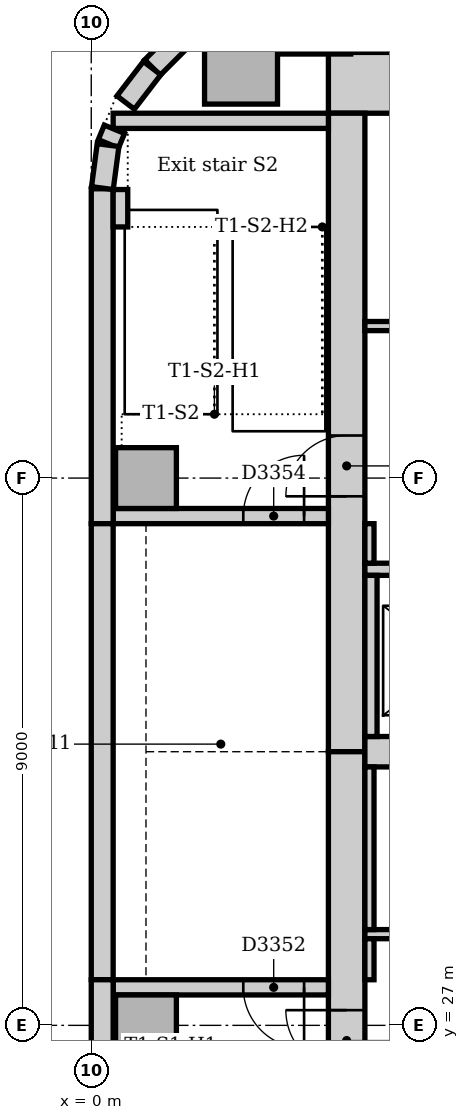
"""IFC4 building model, lengths in metres.
Left out: names, types, materials, properties, quantities, classifications, styles, units other than length and angle.
Written with IfcOpenShell. Run it as: python <this file> out.ifc"""

import sys

from ifc_helpers import new_model, si_unit, direction, frame, frame_2d, origin, origin_2d, place, context, subcontext, project, spatial, rectangle, extrude, element, fill, save


model = new_model("IFC4")
c1 = context("Model", 3, precision=1e-05, world=origin(), true_north=direction((0.0, 1.0)))
c2 = subcontext(c1, "Body", "Model", "MODEL_VIEW")
j1 = project(units=[si_unit("LENGTHUNIT", "METRE"), si_unit("PLANEANGLEUNIT", "RADIAN")], contexts=[c1])
p1 = place(None, origin())
s1 = spatial("IfcSite", under=j1, at=p1, CompositionType="ELEMENT")
p2 = place(p1, origin())
s2 = spatial("IfcBuilding", under=s1, at=p2, CompositionType="ELEMENT")
p3 = place(p2, frame((0.0, 0.0, 42.0)))
s3 = spatial("IfcBuildingStorey", under=s2, at=p3, CompositionType="ELEMENT", Elevation=42.0)
p4 = place(p3, frame((23.5, 42.5, 0.0), z_axis=(0.0, 0.0, 1.0), x_axis=(-1.0, 0.0, 0.0)))
e1 = element("IfcWall", 1, at=p4, inside=s3, PredefinedType="SOLIDWALL", context=c2, shape_type="SweptSolid", body=[
    extrude(rectangle(XDim=19.6, YDim=1.0, at=frame_2d((9.8, 0.0))), origin(), (0.0, 0.0, 1.0), 4.0),
])
p5 = place(p3, frame((4.2, 42.0, 0.0), z_axis=(0.0, 0.0, 1.0), x_axis=(0.0, -1.0, 0.0)))
e2 = element("IfcWall", 2, at=p5, inside=s3, PredefinedType="SOLIDWALL", context=c2, shape_type="SweptSolid", body=[
    extrude(rectangle(XDim=10.5, YDim=0.6, at=frame_2d((5.25, 0.0))), origin(), (0.0, 0.0, 1.0), 4.0),
])
p6 = place(p5, frame((5.3, 0.0, 0.0)))
e3 = element("IfcOpeningElement", 3, at=p6, cuts=e2, PredefinedType="OPENING", context=c2, shape_type="SweptSolid", body=[
    extrude(rectangle(XDim=1.0, YDim=2.1, at=frame_2d((0.5, 1.05))), frame((0.0, 0.31, 0.0), z_axis=(0.0, -1.0, 0.0), x_axis=(1.0, 0.0, 0.0)), (0.0, 0.0, 1.0), 0.62),
])
p7 = place(p3, frame((4.2, 31.5, 0.0), z_axis=(0.0, 0.0, 1.0), x_axis=(0.0, -1.0, 0.0)))
e4 = element("IfcWall", 4, at=p7, inside=s3, PredefinedType="SOLIDWALL", context=c2, shape_type="SweptSolid", body=[
    extrude(rectangle(XDim=10.5, YDim=0.6, at=frame_2d((5.25, 0.0))), origin(), (0.0, 0.0, 1.0), 4.0),
])
p8 = place(p7, frame((4.25, 0.0, 0.0)))
e5 = element("IfcOpeningElement", 5, at=p8, cuts=e4, PredefinedType="OPENING", context=c2, shape_type="SweptSolid", body=[
    extrude(rectangle(XDim=1.0, YDim=2.1, at=frame_2d((0.5, 1.05))), frame((0.0, 0.31, 0.0), z_axis=(0.0, -1.0, 0.0), x_axis=(1.0, 0.0, 0.0)), (0.0, 0.0, 1.0), 0.62),
])
p9 = place(p3, frame((4.5, 31.5, 0.0), z_axis=(0.0, 0.0, 1.0), x_axis=(1.0, 0.0, 0.0)))
e6 = element("IfcWall", 6, at=p9, inside=s3, PredefinedType="SOLIDWALL", context=c2, shape_type="SweptSolid", body=[
    extrude(rectangle(XDim=18.0, YDim=0.5, at=frame_2d((9.0, 0.0))), origin(), (0.0, 0.0, 1.0), 4.0),
])
p10 = place(p3, frame((3.9, 27.625, 0.0), z_axis=(0.0, 0.0, 1.0), x_axis=(-1.0, 0.0, 0.0)))
e7 = element("IfcWall", 7, at=p10, inside=s3, PredefinedType="SOLIDWALL", context=c2, shape_type="SweptSolid", body=[
    extrude(rectangle(XDim=3.54, YDim=0.25, at=frame_2d((1.77, 0.0))), origin(), (0.0, 0.0, 1.0), 4.0),
])
p11 = place(p10, frame((0.4, 0.0, 0.0)))
e8 = element("IfcOpeningElement", 8, at=p11, cuts=e7, PredefinedType="OPENING", context=c2, shape_type="SweptSolid", body=[
    extrude(rectangle(XDim=1.0, YDim=2.1, at=frame_2d((0.5, 1.05))), frame((0.0, 0.135, 0.0), z_axis=(0.0, -1.0, 0.0), x_axis=(1.0, 0.0, 0.0)), (0.0, 0.0, 1.0), 0.27),
])
p12 = place(p3, frame((0.36, 35.375, 0.0), z_axis=(0.0, 0.0, 1.0), x_axis=(1.0, 0.0, 0.0)))
e9 = element("IfcWall", 9, at=p12, inside=s3, PredefinedType="SOLIDWALL", context=c2, shape_type="SweptSolid", body=[
    extrude(rectangle(XDim=3.54, YDim=0.25, at=frame_2d((1.77, 0.0))), origin(), (0.0, 0.0, 1.0), 4.0),
])
p13 = place(p12, frame((2.14, 0.0, 0.0)))
e10 = element("IfcOpeningElement", 10, at=p13, cuts=e9, PredefinedType="OPENING", context=c2, shape_type="SweptSolid", body=[
    extrude(rectangle(XDim=1.0, YDim=2.1, at=frame_2d((0.5, 1.05))), frame((0.0, 0.135, 0.0), z_axis=(0.0, -1.0, 0.0), x_axis=(1.0, 0.0, 0.0)), (0.0, 0.0, 1.0), 0.27),
])
p14 = place(p3, frame((3.9, 41.875, 0.0), z_axis=(0.0, 0.0, 1.0), x_axis=(-1.0, 0.0, 0.0)))
e11 = element("IfcWall", 11, at=p14, inside=s3, PredefinedType="SOLIDWALL", context=c2, shape_type="SweptSolid", body=[
    extrude(rectangle(XDim=3.54, YDim=0.25, at=frame_2d((1.77, 0.0))), origin(), (0.0, 0.0, 1.0), 4.0),
])
for number, where, z_axis, x_axis in (
    (12, (3.667, 43.574, 0.0), (0.0, 0.0, 1.0), (1.0, 0.0, 0.0)),
    (13, (2.463, 42.75, 0.0), (0.0, 0.0, 1.0), (1.0, 0.0, 0.0)),
):
    element("IfcColumn", number, at=place(p3, frame(where, z_axis=z_axis, x_axis=x_axis)), inside=s3, PredefinedType="COLUMN", context=c2, shape_type="SweptSolid", body=[
        extrude(rectangle(XDim=1.2, YDim=1.2, at=origin_2d()), origin(), (0.0, 0.0, 1.0), 3.7),
    ])
for number, where, z_axis, x_axis in (
    (14, (0.9, 27.0, 0.0), (0.0, 0.0, 1.0), (1.0, 0.0, 0.0)),
    (15, (0.9, 36.0, 0.0), (0.0, 0.0, 1.0), (1.0, 0.0, 0.0)),
):
    element("IfcColumn", number, at=place(p3, frame(where, z_axis=z_axis, x_axis=x_axis)), inside=s3, PredefinedType="COLUMN", context=c2, shape_type="SweptSolid", body=[
        extrude(rectangle(XDim=1.0, YDim=1.0, at=origin_2d()), origin(), (0.0, 0.0, 1.0), 4.0),
    ])
p15 = place(p3, frame((2.249, 43.994, 0.0), z_axis=(0.0, 0.0, 1.0), x_axis=(-0.707106781187, -0.707106781187, 0.0)))
e16 = element("IfcWall", 16, at=p15, inside=s3, PredefinedType="STANDARD", context=c2, shape_type="SweptSolid", body=[
    extrude(rectangle(XDim=1.757, YDim=0.36, at=frame_2d((0.879, 0.0))), origin(), (0.0, 0.0, 1.0), 3.7),
])
p16 = place(p3, frame((0.18, 40.757, 0.0), z_axis=(0.0, 0.0, 1.0), x_axis=(0.0, -1.0, 0.0)))
e17 = element("IfcWall", 17, at=p16, inside=s3, PredefinedType="STANDARD", context=c2, shape_type="SweptSolid", body=[
    extrude(rectangle(XDim=5.507, YDim=0.36, at=frame_2d((2.754, 0.0))), origin(), (0.0, 0.0, 1.0), 3.7),
])
p17 = place(p3, frame((0.18, 35.25, 0.0), z_axis=(0.0, 0.0, 1.0), x_axis=(0.0, -1.0, 0.0)))
e18 = element("IfcWall", 18, at=p17, inside=s3, PredefinedType="STANDARD", context=c2, shape_type="SweptSolid", body=[
    extrude(rectangle(XDim=7.5, YDim=0.36, at=frame_2d((3.75, 0.0))), origin(), (0.0, 0.0, 1.0), 3.7),
])
p18 = place(p3, frame((0.18, 27.75, 0.0), z_axis=(0.0, 0.0, 1.0), x_axis=(0.0, -1.0, 0.0)))
e19 = element("IfcWall", 19, at=p18, inside=s3, PredefinedType="STANDARD", context=c2, shape_type="SweptSolid", body=[
    extrude(rectangle(XDim=6.75, YDim=0.36, at=frame_2d((3.375, 0.0))), origin(), (0.0, 0.0, 1.0), 3.7),
])
p19 = place(p3, frame((1.0, 42.741, 0.0), z_axis=(0.0, 0.0, 1.0), x_axis=(-0.608802368033, -0.793321924995, 0.0)))
e20 = element("IfcWall", 20, at=p19, inside=s3, PredefinedType="STANDARD", context=c2, shape_type="SweptSolid", body=[
    extrude(rectangle(XDim=0.713, YDim=0.36, at=frame_2d((0.357, 0.0))), origin(), (0.0, 0.0, 1.0), 3.7),
])
p20 = place(p3, frame((0.381, 41.736, 0.0), z_axis=(0.0, 0.0, 1.0), x_axis=(-0.382773360986, -0.923842277729, 0.0)))
e21 = element("IfcWall", 21, at=p20, inside=s3, PredefinedType="STANDARD", context=c2, shape_type="SweptSolid", body=[
    extrude(rectangle(XDim=0.258, YDim=0.36, at=frame_2d((0.129, 0.0))), origin(), (0.0, 0.0, 1.0), 3.7),
])
p21 = place(p3, frame((0.276, 41.476, 0.0), z_axis=(0.0, 0.0, 1.0), x_axis=(-0.13055608231, -0.99144092581, 0.0)))
e22 = element("IfcWall", 22, at=p21, inside=s3, PredefinedType="STANDARD", context=c2, shape_type="SweptSolid", body=[
    extrude(rectangle(XDim=0.713, YDim=0.36, at=frame_2d((0.356, 0.0))), origin(), (0.0, 0.0, 1.0), 3.7),
])
p22 = place(p3, frame((0.48, 40.13, 0.0), z_axis=(0.0, 0.0, 1.0), x_axis=(0.0, 1.0, 0.0)))
e23 = element("IfcWall", 23, at=p22, inside=s3, PredefinedType="STANDARD", context=c2, shape_type="SweptSolid", body=[
    extrude(rectangle(XDim=0.615, YDim=0.24, at=frame_2d((0.307, 0.0))), origin(), (0.0, 0.0, 1.0), 4.0),
])
p23 = place(p3, frame((4.5, 34.5, 0.0), z_axis=(0.0, 0.0, 1.0), x_axis=(1.0, 0.0, 0.0)))
e24 = element("IfcWall", 24, at=p23, inside=s3, PredefinedType="PARTITIONING", context=c2, shape_type="SweptSolid", body=[
    extrude(rectangle(XDim=18.0, YDim=0.2, at=frame_2d((9.0, 0.0))), origin(), (0.0, 0.0, 1.0), 3.7),
])
p24 = place(p23, frame((0.95, 0.0, 0.0)))
e25 = element("IfcOpeningElement", 25, at=p24, cuts=e24, PredefinedType="OPENING", context=c2, shape_type="SweptSolid", body=[
    extrude(rectangle(XDim=1.1, YDim=2.1, at=frame_2d((0.55, 1.05))), frame((0.0, 0.11, 0.0), z_axis=(0.0, -1.0, 0.0), x_axis=(1.0, 0.0, 0.0)), (0.0, 0.0, 1.0), 0.22),
])
p25 = place(p23, frame((3.95, 0.0, 0.0)))
e26 = element("IfcOpeningElement", 26, at=p25, cuts=e24, PredefinedType="OPENING", context=c2, shape_type="SweptSolid", body=[
    extrude(rectangle(XDim=1.1, YDim=2.1, at=frame_2d((0.55, 1.05))), frame((0.0, 0.11, 0.0), z_axis=(0.0, -1.0, 0.0), x_axis=(1.0, 0.0, 0.0)), (0.0, 0.0, 1.0), 0.22),
])
p26 = place(p23, frame((12.95, 0.0, 0.0)))
e27 = element("IfcOpeningElement", 27, at=p26, cuts=e24, PredefinedType="OPENING", context=c2, shape_type="SweptSolid", body=[
    extrude(rectangle(XDim=1.1, YDim=2.1, at=frame_2d((0.55, 1.05))), frame((0.0, 0.11, 0.0), z_axis=(0.0, -1.0, 0.0), x_axis=(1.0, 0.0, 0.0)), (0.0, 0.0, 1.0), 0.22),
])
p27 = place(p23, frame((15.95, 0.0, 0.0)))
e28 = element("IfcOpeningElement", 28, at=p27, cuts=e24, PredefinedType="OPENING", context=c2, shape_type="SweptSolid", body=[
    extrude(rectangle(XDim=1.1, YDim=2.1, at=frame_2d((0.55, 1.05))), frame((0.0, 0.11, 0.0), z_axis=(0.0, -1.0, 0.0), x_axis=(1.0, 0.0, 0.0)), (0.0, 0.0, 1.0), 0.22),
])
p28 = place(p3, frame((4.6, 31.75, 0.0), z_axis=(0.0, 0.0, 1.0), x_axis=(0.0, 1.0, 0.0)))
e29 = element("IfcWall", 29, at=p28, inside=s3, PredefinedType="PARTITIONING", context=c2, shape_type="SweptSolid", body=[
    extrude(rectangle(XDim=2.65, YDim=0.2, at=frame_2d((1.325, 0.0))), origin(), (0.0, 0.0, 1.0), 3.7),
])
p29 = place(p3, frame((4.5, 28.5, 0.0), z_axis=(0.0, 0.0, 1.0), x_axis=(1.0, 0.0, 0.0)))
e30 = element("IfcWall", 30, at=p29, inside=s3, PredefinedType="PARTITIONING", context=c2, shape_type="SweptSolid", body=[
    extrude(rectangle(XDim=18.0, YDim=0.15, at=frame_2d((9.0, 0.0))), origin(), (0.0, 0.0, 1.0), 3.7),
])
p30 = place(p29, frame((3.35, 0.0, 0.0)))
e31 = element("IfcOpeningElement", 31, at=p30, cuts=e30, PredefinedType="OPENING", context=c2, shape_type="SweptSolid", body=[
    extrude(rectangle(XDim=0.9, YDim=2.1, at=frame_2d((0.45, 1.05))), frame((0.0, 0.085, 0.0), z_axis=(0.0, -1.0, 0.0), x_axis=(1.0, 0.0, 0.0)), (0.0, 0.0, 1.0), 0.17),
])
p31 = place(p29, frame((8.55, 0.0, 0.0)))
e32 = element("IfcOpeningElement", 32, at=p31, cuts=e30, PredefinedType="OPENING", context=c2, shape_type="SweptSolid", body=[
    extrude(rectangle(XDim=0.9, YDim=2.1, at=frame_2d((0.45, 1.05))), frame((0.0, 0.085, 0.0), z_axis=(0.0, -1.0, 0.0), x_axis=(1.0, 0.0, 0.0)), (0.0, 0.0, 1.0), 0.17),
])
p32 = place(p29, frame((13.7, 0.0, 0.0)))
e33 = element("IfcOpeningElement", 33, at=p32, cuts=e30, PredefinedType="OPENING", context=c2, shape_type="SweptSolid", body=[
    extrude(rectangle(XDim=0.9, YDim=2.1, at=frame_2d((0.45, 1.05))), frame((0.0, 0.085, 0.0), z_axis=(0.0, -1.0, 0.0), x_axis=(1.0, 0.0, 0.0)), (0.0, 0.0, 1.0), 0.17),
])
p33 = place(p3, frame((4.5, 38.5, 0.0), z_axis=(0.0, 0.0, 1.0), x_axis=(1.0, 0.0, 0.0)))
e34 = element("IfcWall", 34, at=p33, inside=s3, PredefinedType="PARTITIONING", context=c2, shape_type="SweptSolid", body=[
    extrude(rectangle(XDim=11.9, YDim=0.15, at=frame_2d((5.95, 0.0))), origin(), (0.0, 0.0, 1.0), 3.7),
])
p34 = place(p33, frame((1.1, 0.0, 0.0)))
e35 = element("IfcOpeningElement", 35, at=p34, cuts=e34, PredefinedType="OPENING", context=c2, shape_type="SweptSolid", body=[
    extrude(rectangle(XDim=0.9, YDim=2.1, at=frame_2d((0.45, 1.05))), frame((0.0, 0.085, 0.0), z_axis=(0.0, -1.0, 0.0), x_axis=(1.0, 0.0, 0.0)), (0.0, 0.0, 1.0), 0.17),
])
p35 = place(p33, frame((3.3, 0.0, 0.0)))
e36 = element("IfcOpeningElement", 36, at=p35, cuts=e34, PredefinedType="OPENING", context=c2, shape_type="SweptSolid", body=[
    extrude(rectangle(XDim=0.9, YDim=2.1, at=frame_2d((0.45, 1.05))), frame((0.0, 0.085, 0.0), z_axis=(0.0, -1.0, 0.0), x_axis=(1.0, 0.0, 0.0)), (0.0, 0.0, 1.0), 0.17),
])
p36 = place(p33, frame((6.3, 0.0, 0.0)))
e37 = element("IfcOpeningElement", 37, at=p36, cuts=e34, PredefinedType="OPENING", context=c2, shape_type="SweptSolid", body=[
    extrude(rectangle(XDim=0.9, YDim=2.1, at=frame_2d((0.45, 1.05))), frame((0.0, 0.085, 0.0), z_axis=(0.0, -1.0, 0.0), x_axis=(1.0, 0.0, 0.0)), (0.0, 0.0, 1.0), 0.17),
])
p37 = place(p33, frame((9.95, 0.0, 0.0)))
e38 = element("IfcOpeningElement", 38, at=p37, cuts=e34, PredefinedType="OPENING", context=c2, shape_type="SweptSolid", body=[
    extrude(rectangle(XDim=0.8, YDim=2.1, at=frame_2d((0.4, 1.05))), frame((0.0, 0.085, 0.0), z_axis=(0.0, -1.0, 0.0), x_axis=(1.0, 0.0, 0.0)), (0.0, 0.0, 1.0), 0.17),
])
p38 = place(p3, frame((4.575, 27.75, 0.0), z_axis=(0.0, 0.0, 1.0), x_axis=(0.0, 1.0, 0.0)))
e39 = element("IfcWall", 39, at=p38, inside=s3, PredefinedType="PARTITIONING", context=c2, shape_type="SweptSolid", body=[
    extrude(rectangle(XDim=0.675, YDim=0.15, at=frame_2d((0.338, 0.0))), origin(), (0.0, 0.0, 1.0), 3.7),
])
p39 = place(p3, frame((4.575, 28.575, 0.0), z_axis=(0.0, 0.0, 1.0), x_axis=(0.0, 1.0, 0.0)))
e40 = element("IfcWall", 40, at=p39, inside=s3, PredefinedType="PARTITIONING", context=c2, shape_type="SweptSolid", body=[
    extrude(rectangle(XDim=2.675, YDim=0.15, at=frame_2d((1.337, 0.0))), origin(), (0.0, 0.0, 1.0), 3.7),
])
p40 = place(p3, frame((4.575, 34.6, 0.0), z_axis=(0.0, 0.0, 1.0), x_axis=(0.0, 1.0, 0.0)))
e41 = element("IfcWall", 41, at=p40, inside=s3, PredefinedType="PARTITIONING", context=c2, shape_type="SweptSolid", body=[
    extrude(rectangle(XDim=0.65, YDim=0.15, at=frame_2d((0.325, 0.0))), origin(), (0.0, 0.0, 1.0), 3.7),
])
p41 = place(p8, frame((1.0, 0.0, 0.0), z_axis=(0.0, 0.0, 1.0), x_axis=(-1.0, 0.0, 0.0)))
e42 = element("IfcDoor", 42, at=p41, inside=s3, OperationType="SINGLE_SWING_RIGHT", PredefinedType="DOOR", context=c2, shape_type="SweptSolid", body=[
    extrude(rectangle(XDim=1.0, YDim=2.1, at=frame_2d((0.5, 1.05))), frame((0.0, 0.025, 0.0), z_axis=(0.0, -1.0, 0.0), x_axis=(1.0, 0.0, 0.0)), (0.0, 0.0, 1.0), 0.05),
])
fill(e5, e42)
p42 = place(p11, origin())
e43 = element("IfcDoor", 43, at=p42, inside=s3, OperationType="SINGLE_SWING_LEFT", PredefinedType="DOOR", context=c2, shape_type="SweptSolid", body=[
    extrude(rectangle(XDim=1.0, YDim=2.1, at=frame_2d((0.5, 1.05))), frame((0.0, 0.025, 0.0), z_axis=(0.0, -1.0, 0.0), x_axis=(1.0, 0.0, 0.0)), (0.0, 0.0, 1.0), 0.05),
])
fill(e8, e43)
p43 = place(p6, frame((1.0, 0.0, 0.0), z_axis=(0.0, 0.0, 1.0), x_axis=(-1.0, 0.0, 0.0)))
e44 = element("IfcDoor", 44, at=p43, inside=s3, OperationType="SINGLE_SWING_LEFT", PredefinedType="DOOR", context=c2, shape_type="SweptSolid", body=[
    extrude(rectangle(XDim=1.0, YDim=2.1, at=frame_2d((0.5, 1.05))), frame((0.0, 0.025, 0.0), z_axis=(0.0, -1.0, 0.0), x_axis=(1.0, 0.0, 0.0)), (0.0, 0.0, 1.0), 0.05),
])
fill(e3, e44)
p44 = place(p13, origin())
e45 = element("IfcDoor", 45, at=p44, inside=s3, OperationType="SINGLE_SWING_RIGHT", PredefinedType="DOOR", context=c2, shape_type="SweptSolid", body=[
    extrude(rectangle(XDim=1.0, YDim=2.1, at=frame_2d((0.5, 1.05))), frame((0.0, 0.025, 0.0), z_axis=(0.0, -1.0, 0.0), x_axis=(1.0, 0.0, 0.0)), (0.0, 0.0, 1.0), 0.05),
])
fill(e10, e45)
save(model, sys.argv[1])
